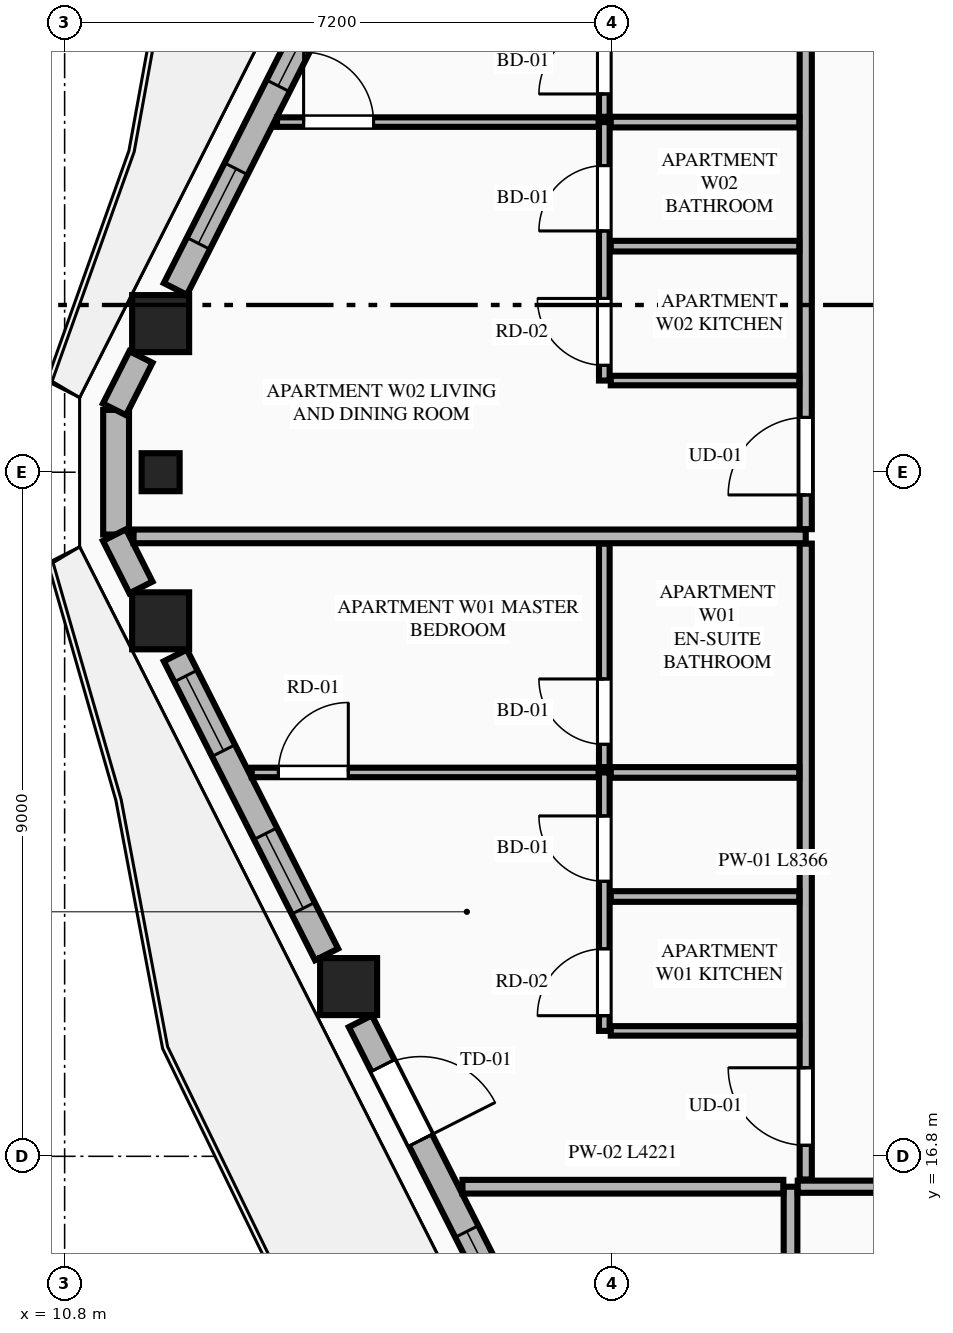
"""IFC4 building model, lengths in metres.
Left out: names, types, materials, properties, quantities, classifications, styles, units other than length and angle.
Written with IfcOpenShell. Run it as: python <this file> out.ifc"""

import sys

from ifc_helpers import new_model, si_unit, direction, frame, frame_2d, origin, origin_2d, place, context, subcontext, project, spatial, rectangle, extrude, element, fill, save


model = new_model("IFC4")
c1 = context("Model", 3, precision=1e-05, world=origin(), true_north=direction((0.0, 1.0)))
c2 = subcontext(c1, "Body", "Model", "MODEL_VIEW")
j1 = project(units=[si_unit("LENGTHUNIT", "METRE"), si_unit("PLANEANGLEUNIT", "RADIAN")], contexts=[c1])
p1 = place(None, origin())
s1 = spatial("IfcSite", under=j1, at=p1, CompositionType="ELEMENT")
p2 = place(p1, origin())
s2 = spatial("IfcBuilding", under=s1, at=p2, CompositionType="ELEMENT")
p3 = place(p2, frame((0.0, 0.0, 256.2)))
s3 = spatial("IfcBuildingStorey", under=s2, at=p3, CompositionType="ELEMENT", Elevation=256.2)
for number, where, z_axis, x_axis in (
    (1, (12.063, 27.755, 0.0), (0.0, 0.0, 1.0), (1.0, 0.0, 0.0)),
    (2, (12.063, 23.845, 0.0), (0.0, 0.0, 1.0), (1.0, 0.0, 0.0)),
    (3, (14.536, 19.033, 0.0), (0.0, 0.0, 1.0), (1.0, 0.0, 0.0)),
):
    element("IfcColumn", number, at=place(p3, frame(where, z_axis=z_axis, x_axis=x_axis)), inside=s3, PredefinedType="COLUMN", context=c2, shape_type="SweptSolid", body=[
        extrude(rectangle(XDim=0.75, YDim=0.75, at=origin_2d()), origin(), (0.0, 0.0, 1.0), 3.65),
    ])
p4 = place(p3, frame((12.063, 25.8, 0.0), z_axis=(0.0, 0.0, 1.0), x_axis=(0.0, -1.0, 0.0)))
e4 = element("IfcColumn", 4, at=p4, inside=s3, PredefinedType="PILASTER", context=c2, shape_type="SweptSolid", body=[
    extrude(rectangle(XDim=0.5, YDim=0.35, at=origin_2d()), origin(), (0.0, 0.0, 1.0), 3.65),
])
p5 = place(p3, frame((11.477, 26.62, 0.0), z_axis=(0.0, 0.0, 1.0), x_axis=(0.0, -1.0, 0.0)))
e5 = element("IfcWall", 5, at=p5, inside=s3, PredefinedType="STANDARD", context=c2, shape_type="SweptSolid", body=[
    extrude(rectangle(XDim=1.64, YDim=0.34, at=frame_2d((0.82, 0.0))), origin(), (0.0, 0.0, 1.0), 3.45),
])
p6 = place(p3, frame((14.246, 32.144, 0.0), z_axis=(0.0, 0.0, 1.0), x_axis=(-0.451285866323, -0.892379441077, 0.0)))
e6 = element("IfcWall", 6, at=p6, inside=s3, PredefinedType="STANDARD", context=c2, shape_type="SweptSolid", body=[
    extrude(rectangle(XDim=4.407, YDim=0.34, at=frame_2d((2.204, 0.0))), origin(), (0.0, 0.0, 1.0), 2.983),
])
p7 = place(p6, frame((0.313, 0.0, 0.75)))
e7 = element("IfcOpeningElement", 7, at=p7, cuts=e6, PredefinedType="OPENING", context=c2, shape_type="SweptSolid", body=[
    extrude(rectangle(XDim=1.1, YDim=2.0, at=frame_2d((0.55, 1.0))), frame((0.0, 0.18, 0.0), z_axis=(0.0, -1.0, 0.0), x_axis=(1.0, 0.0, 0.0)), (0.0, 0.0, 1.0), 0.36),
])
p8 = place(p6, frame((2.636, 0.0, 0.75)))
e8 = element("IfcOpeningElement", 8, at=p8, cuts=e6, PredefinedType="OPENING", context=c2, shape_type="SweptSolid", body=[
    extrude(rectangle(XDim=1.1, YDim=2.0, at=frame_2d((0.55, 1.0))), frame((0.0, 0.18, 0.0), z_axis=(0.0, -1.0, 0.0), x_axis=(1.0, 0.0, 0.0)), (0.0, 0.0, 1.0), 0.36),
])
for number, where, z_axis, x_axis in (
    (9, (11.804, 27.316, 0.0), (0.0, 0.0, 1.0), (-0.451, -0.893, 0.0)),
    (10, (11.456, 24.973, 0.0), (0.0, 0.0, 1.0), (0.451, -0.893, 0.0)),
):
    element("IfcWall", number, at=place(p3, frame(where, z_axis=z_axis, x_axis=x_axis)), inside=s3, PredefinedType="STANDARD", context=c2, shape_type="SweptSolid", body=[
        extrude(rectangle(XDim=0.772, YDim=0.34, at=frame_2d((0.386, 0.0))), origin(), (0.0, 0.0, 1.0), 3.45),
    ])
p9 = place(p3, frame((12.257, 23.389, 0.0), z_axis=(0.0, 0.0, 1.0), x_axis=(0.45130817501, -0.892368158984, 0.0)))
e11 = element("IfcWall", 11, at=p9, inside=s3, PredefinedType="STANDARD", context=c2, shape_type="SweptSolid", body=[
    extrude(rectangle(XDim=4.407, YDim=0.34, at=frame_2d((2.204, 0.0))), origin(), (0.0, 0.0, 1.0), 2.983),
])
p10 = place(p9, frame((0.303, 0.0, 0.75)))
e12 = element("IfcOpeningElement", 12, at=p10, cuts=e11, PredefinedType="OPENING", context=c2, shape_type="SweptSolid", body=[
    extrude(rectangle(XDim=1.1, YDim=2.0, at=frame_2d((0.55, 1.0))), frame((0.0, 0.18, 0.0), z_axis=(0.0, -1.0, 0.0), x_axis=(1.0, 0.0, 0.0)), (0.0, 0.0, 1.0), 0.36),
])
p11 = place(p9, frame((2.627, 0.0, 0.75)))
e13 = element("IfcOpeningElement", 13, at=p11, cuts=e11, PredefinedType="OPENING", context=c2, shape_type="SweptSolid", body=[
    extrude(rectangle(XDim=1.1, YDim=2.0, at=frame_2d((0.55, 1.0))), frame((0.0, 0.18, 0.0), z_axis=(0.0, -1.0, 0.0), x_axis=(1.0, 0.0, 0.0)), (0.0, 0.0, 1.0), 0.36),
])
p12 = place(p3, frame((14.691, 18.577, 0.0), z_axis=(0.0, 0.0, 1.0), x_axis=(0.451581819983, -0.892229712496, 0.0)))
e14 = element("IfcWall", 14, at=p12, inside=s3, PredefinedType="STANDARD", context=c2, shape_type="SweptSolid", body=[
    extrude(rectangle(XDim=4.6, YDim=0.34, at=frame_2d((2.3, 0.0))), origin(), (0.0, 0.0, 1.0), 2.983),
])
p13 = place(p12, frame((0.654, 0.0, 0.0)))
e15 = element("IfcOpeningElement", 15, at=p13, cuts=e14, PredefinedType="OPENING", context=c2, shape_type="SweptSolid", body=[
    extrude(rectangle(XDim=1.1, YDim=2.25, at=frame_2d((0.55, 1.125))), frame((0.0, 0.18, 0.0), z_axis=(0.0, -1.0, 0.0), x_axis=(1.0, 0.0, 0.0)), (0.0, 0.0, 1.0), 0.36),
])
p14 = place(p12, frame((3.1, 0.0, 0.75)))
e16 = element("IfcOpeningElement", 16, at=p14, cuts=e14, PredefinedType="OPENING", context=c2, shape_type="SweptSolid", body=[
    extrude(rectangle(XDim=1.1, YDim=2.0, at=frame_2d((0.55, 1.0))), frame((0.0, 0.18, 0.0), z_axis=(0.0, -1.0, 0.0), x_axis=(1.0, 0.0, 0.0)), (0.0, 0.0, 1.0), 0.36),
])
p15 = place(p3, frame((20.35, 8.119, 0.0), z_axis=(0.0, 0.0, 1.0), x_axis=(0.0, 1.0, 0.0)))
e17 = element("IfcWall", 17, at=p15, inside=s3, PredefinedType="PARTITIONING", context=c2, shape_type="SweptSolid", body=[
    extrude(rectangle(XDim=8.281, YDim=0.18, at=frame_2d((4.141, 0.0))), origin(), (0.0, 0.0, 1.0), 3.45),
])
p16 = place(p3, frame((20.445, 16.4, 0.0), z_axis=(0.0, 0.0, 1.0), x_axis=(1.0, 0.0, 0.0)))
e18 = element("IfcWall", 18, at=p16, inside=s3, PredefinedType="PARTITIONING", context=c2, shape_type="SweptSolid", body=[
    extrude(rectangle(XDim=15.114, YDim=0.16, at=frame_2d((7.557, 0.0))), origin(), (0.0, 0.0, 1.0), 3.45),
])
p17 = place(p16, frame((13.259, 0.0, 0.0)))
e19 = element("IfcOpeningElement", 19, at=p17, cuts=e18, PredefinedType="OPENING", context=c2, shape_type="SweptSolid", body=[
    extrude(rectangle(XDim=1.02, YDim=2.25, at=frame_2d((0.51, 1.125))), frame((0.0, 0.09, 0.0), z_axis=(0.0, -1.0, 0.0), x_axis=(1.0, 0.0, 0.0)), (0.0, 0.0, 1.0), 0.18),
])
p18 = place(p3, frame((16.034, 16.4, 0.0), z_axis=(0.0, 0.0, 1.0), x_axis=(1.0, 0.0, 0.0)))
e20 = element("IfcWall", 20, at=p18, inside=s3, PredefinedType="PARTITIONING", context=c2, shape_type="SweptSolid", body=[
    extrude(rectangle(XDim=4.221, YDim=0.18, at=frame_2d((2.11, 0.0))), origin(), (0.0, 0.0, 1.0), 3.45),
])
p19 = place(p3, frame((20.55, 16.495, 0.0), z_axis=(0.0, 0.0, 1.0), x_axis=(0.0, 1.0, 0.0)))
e21 = element("IfcWall", 21, at=p19, inside=s3, PredefinedType="PARTITIONING", context=c2, shape_type="SweptSolid", body=[
    extrude(rectangle(XDim=8.366, YDim=0.16, at=frame_2d((4.183, 0.0))), origin(), (0.0, 0.0, 1.0), 3.137),
])
p20 = place(p19, frame((0.45, 0.0, 0.0)))
e22 = element("IfcOpeningElement", 22, at=p20, cuts=e21, PredefinedType="OPENING", context=c2, shape_type="SweptSolid", body=[
    extrude(rectangle(XDim=1.02, YDim=2.25, at=frame_2d((0.51, 1.125))), frame((0.0, 0.09, 0.0), z_axis=(0.0, -1.0, 0.0), x_axis=(1.0, 0.0, 0.0)), (0.0, 0.0, 1.0), 0.18),
])
p21 = place(p3, frame((17.985, 18.45, 0.0), z_axis=(0.0, 0.0, 1.0), x_axis=(1.0, 0.0, 0.0)))
e23 = element("IfcWall", 23, at=p21, inside=s3, PredefinedType="PARTITIONING", context=c2, shape_type="SweptSolid", body=[
    extrude(rectangle(XDim=2.48, YDim=0.125, at=frame_2d((1.24, 0.0))), origin(), (0.0, 0.0, 1.0), 3.45),
])
p22 = place(p3, frame((17.9, 18.45, 0.0), z_axis=(0.0, 0.0, 1.0), x_axis=(0.0, 1.0, 0.0)))
e24 = element("IfcWall", 24, at=p22, inside=s3, PredefinedType="PLUMBINGWALL", context=c2, shape_type="SweptSolid", body=[
    extrude(rectangle(XDim=3.4, YDim=0.14, at=frame_2d((1.7, 0.0))), origin(), (0.0, 0.0, 1.0), 3.45),
])
p23 = place(p22, frame((0.2, 0.0, 0.0)))
e25 = element("IfcOpeningElement", 25, at=p23, cuts=e24, PredefinedType="OPENING", context=c2, shape_type="SweptSolid", body=[
    extrude(rectangle(XDim=0.88, YDim=2.15, at=frame_2d((0.44, 1.075))), frame((0.0, 0.08, 0.0), z_axis=(0.0, -1.0, 0.0), x_axis=(1.0, 0.0, 0.0)), (0.0, 0.0, 1.0), 0.16),
])
p24 = place(p22, frame((1.968, 0.0, 0.0)))
e26 = element("IfcOpeningElement", 26, at=p24, cuts=e24, PredefinedType="OPENING", context=c2, shape_type="SweptSolid", body=[
    extrude(rectangle(XDim=0.86, YDim=2.1, at=frame_2d((0.43, 1.05))), frame((0.0, 0.08, 0.0), z_axis=(0.0, -1.0, 0.0), x_axis=(1.0, 0.0, 0.0)), (0.0, 0.0, 1.0), 0.16),
])
p25 = place(p3, frame((17.9, 21.92, 0.0), z_axis=(0.0, 0.0, 1.0), x_axis=(0.0, 1.0, 0.0)))
e27 = element("IfcWall", 27, at=p25, inside=s3, PredefinedType="PLUMBINGWALL", context=c2, shape_type="SweptSolid", body=[
    extrude(rectangle(XDim=2.941, YDim=0.14, at=frame_2d((1.471, 0.0))), origin(), (0.0, 0.0, 1.0), 3.45),
])
p26 = place(p25, frame((0.3, 0.0, 0.0)))
e28 = element("IfcOpeningElement", 28, at=p26, cuts=e27, PredefinedType="OPENING", context=c2, shape_type="SweptSolid", body=[
    extrude(rectangle(XDim=0.86, YDim=2.1, at=frame_2d((0.43, 1.05))), frame((0.0, 0.08, 0.0), z_axis=(0.0, -1.0, 0.0), x_axis=(1.0, 0.0, 0.0)), (0.0, 0.0, 1.0), 0.16),
])
p27 = place(p3, frame((17.985, 21.85, 0.0), z_axis=(0.0, 0.0, 1.0), x_axis=(1.0, 0.0, 0.0)))
e29 = element("IfcWall", 29, at=p27, inside=s3, PredefinedType="PLUMBINGWALL", context=c2, shape_type="SweptSolid", body=[
    extrude(rectangle(XDim=2.48, YDim=0.14, at=frame_2d((1.24, 0.0))), origin(), (0.0, 0.0, 1.0), 3.45),
])
p28 = place(p3, frame((13.262, 21.85, 0.0), z_axis=(0.0, 0.0, 1.0), x_axis=(1.0, 0.0, 0.0)))
e30 = element("IfcWall", 30, at=p28, inside=s3, PredefinedType="PARTITIONING", context=c2, shape_type="SweptSolid", body=[
    extrude(rectangle(XDim=4.563, YDim=0.125, at=frame_2d((2.281, 0.0))), origin(), (0.0, 0.0, 1.0), 3.45),
])
p29 = place(p28, frame((0.35, 0.0, 0.0)))
e31 = element("IfcOpeningElement", 31, at=p29, cuts=e30, PredefinedType="OPENING", context=c2, shape_type="SweptSolid", body=[
    extrude(rectangle(XDim=0.92, YDim=2.15, at=frame_2d((0.46, 1.075))), frame((0.0, 0.073, 0.0), z_axis=(0.0, -1.0, 0.0), x_axis=(1.0, 0.0, 0.0)), (0.0, 0.0, 1.0), 0.145),
])
p30 = place(p3, frame((17.985, 20.218, 0.0), z_axis=(0.0, 0.0, 1.0), x_axis=(1.0, 0.0, 0.0)))
e32 = element("IfcWall", 32, at=p30, inside=s3, PredefinedType="PLUMBINGWALL", context=c2, shape_type="SweptSolid", body=[
    extrude(rectangle(XDim=2.48, YDim=0.14, at=frame_2d((1.24, 0.0))), origin(), (0.0, 0.0, 1.0), 3.45),
])
p31 = place(p3, frame((11.707, 24.956, 0.0), z_axis=(0.0, 0.0, 1.0), x_axis=(1.0, 0.0, 0.0)))
e33 = element("IfcWall", 33, at=p31, inside=s3, PredefinedType="PARTITIONING", context=c2, shape_type="SweptSolid", body=[
    extrude(rectangle(XDim=8.843, YDim=0.18, at=frame_2d((4.421, 0.0))), origin(), (0.0, 0.0, 1.0), 3.45),
])
p32 = place(p3, frame((20.55, 25.051, 0.0), z_axis=(0.0, 0.0, 1.0), x_axis=(0.0, 1.0, 0.0)))
e34 = element("IfcWall", 34, at=p32, inside=s3, PredefinedType="PARTITIONING", context=c2, shape_type="SweptSolid", body=[
    extrude(rectangle(XDim=9.854, YDim=0.16, at=frame_2d((4.927, 0.0))), origin(), (0.0, 0.0, 1.0), 3.137),
])
p33 = place(p32, frame((0.45, 0.0, 0.0)))
e35 = element("IfcOpeningElement", 35, at=p33, cuts=e34, PredefinedType="OPENING", context=c2, shape_type="SweptSolid", body=[
    extrude(rectangle(XDim=1.02, YDim=2.25, at=frame_2d((0.51, 1.125))), frame((0.0, 0.09, 0.0), z_axis=(0.0, -1.0, 0.0), x_axis=(1.0, 0.0, 0.0)), (0.0, 0.0, 1.0), 0.18),
])
p34 = place(p3, frame((17.985, 27.006, 0.0), z_axis=(0.0, 0.0, 1.0), x_axis=(1.0, 0.0, 0.0)))
e36 = element("IfcWall", 36, at=p34, inside=s3, PredefinedType="PARTITIONING", context=c2, shape_type="SweptSolid", body=[
    extrude(rectangle(XDim=2.48, YDim=0.125, at=frame_2d((1.24, 0.0))), origin(), (0.0, 0.0, 1.0), 3.45),
])
p35 = place(p3, frame((17.9, 27.006, 0.0), z_axis=(0.0, 0.0, 1.0), x_axis=(0.0, 1.0, 0.0)))
e37 = element("IfcWall", 37, at=p35, inside=s3, PredefinedType="PLUMBINGWALL", context=c2, shape_type="SweptSolid", body=[
    extrude(rectangle(XDim=3.4, YDim=0.14, at=frame_2d((1.7, 0.0))), origin(), (0.0, 0.0, 1.0), 3.45),
])
p36 = place(p35, frame((0.2, 0.0, 0.0)))
e38 = element("IfcOpeningElement", 38, at=p36, cuts=e37, PredefinedType="OPENING", context=c2, shape_type="SweptSolid", body=[
    extrude(rectangle(XDim=0.88, YDim=2.15, at=frame_2d((0.44, 1.075))), frame((0.0, 0.08, 0.0), z_axis=(0.0, -1.0, 0.0), x_axis=(1.0, 0.0, 0.0)), (0.0, 0.0, 1.0), 0.16),
])
p37 = place(p35, frame((1.968, 0.0, 0.0)))
e39 = element("IfcOpeningElement", 39, at=p37, cuts=e37, PredefinedType="OPENING", context=c2, shape_type="SweptSolid", body=[
    extrude(rectangle(XDim=0.86, YDim=2.1, at=frame_2d((0.43, 1.05))), frame((0.0, 0.08, 0.0), z_axis=(0.0, -1.0, 0.0), x_axis=(1.0, 0.0, 0.0)), (0.0, 0.0, 1.0), 0.16),
])
p38 = place(p3, frame((17.9, 30.476, 0.0), z_axis=(0.0, 0.0, 1.0), x_axis=(0.0, 1.0, 0.0)))
e40 = element("IfcWall", 40, at=p38, inside=s3, PredefinedType="PLUMBINGWALL", context=c2, shape_type="SweptSolid", body=[
    extrude(rectangle(XDim=4.429, YDim=0.14, at=frame_2d((2.214, 0.0))), origin(), (0.0, 0.0, 1.0), 3.45),
])
p39 = place(p38, frame((0.3, 0.0, 0.0)))
e41 = element("IfcOpeningElement", 41, at=p39, cuts=e40, PredefinedType="OPENING", context=c2, shape_type="SweptSolid", body=[
    extrude(rectangle(XDim=0.86, YDim=2.1, at=frame_2d((0.43, 1.05))), frame((0.0, 0.08, 0.0), z_axis=(0.0, -1.0, 0.0), x_axis=(1.0, 0.0, 0.0)), (0.0, 0.0, 1.0), 0.16),
])
p40 = place(p3, frame((17.985, 30.406, 0.0), z_axis=(0.0, 0.0, 1.0), x_axis=(1.0, 0.0, 0.0)))
e42 = element("IfcWall", 42, at=p40, inside=s3, PredefinedType="PLUMBINGWALL", context=c2, shape_type="SweptSolid", body=[
    extrude(rectangle(XDim=2.48, YDim=0.14, at=frame_2d((1.24, 0.0))), origin(), (0.0, 0.0, 1.0), 3.45),
])
p41 = place(p3, frame((13.594, 30.406, 0.0), z_axis=(0.0, 0.0, 1.0), x_axis=(1.0, 0.0, 0.0)))
e43 = element("IfcWall", 43, at=p41, inside=s3, PredefinedType="PARTITIONING", context=c2, shape_type="SweptSolid", body=[
    extrude(rectangle(XDim=4.231, YDim=0.125, at=frame_2d((2.115, 0.0))), origin(), (0.0, 0.0, 1.0), 3.45),
])
p42 = place(p41, frame((0.35, 0.0, 0.0)))
e44 = element("IfcOpeningElement", 44, at=p42, cuts=e43, PredefinedType="OPENING", context=c2, shape_type="SweptSolid", body=[
    extrude(rectangle(XDim=0.92, YDim=2.15, at=frame_2d((0.46, 1.075))), frame((0.0, 0.073, 0.0), z_axis=(0.0, -1.0, 0.0), x_axis=(1.0, 0.0, 0.0)), (0.0, 0.0, 1.0), 0.145),
])
p43 = place(p3, frame((17.985, 28.774, 0.0), z_axis=(0.0, 0.0, 1.0), x_axis=(1.0, 0.0, 0.0)))
e45 = element("IfcWall", 45, at=p43, inside=s3, PredefinedType="PLUMBINGWALL", context=c2, shape_type="SweptSolid", body=[
    extrude(rectangle(XDim=2.48, YDim=0.14, at=frame_2d((1.24, 0.0))), origin(), (0.0, 0.0, 1.0), 3.45),
])
p44 = place(p7, origin())
e46 = element("IfcWindow", 46, at=p44, inside=s3, PartitioningType="SINGLE_PANEL", PredefinedType="WINDOW", context=c2, shape_type="SweptSolid", body=[
    extrude(rectangle(XDim=1.1, YDim=2.0, at=frame_2d((0.55, 1.0))), frame((0.0, 0.03, 0.0), z_axis=(0.0, -1.0, 0.0), x_axis=(1.0, 0.0, 0.0)), (0.0, 0.0, 1.0), 0.06),
])
fill(e7, e46)
p45 = place(p10, origin())
e47 = element("IfcWindow", 47, at=p45, inside=s3, PartitioningType="SINGLE_PANEL", PredefinedType="WINDOW", context=c2, shape_type="SweptSolid", body=[
    extrude(rectangle(XDim=1.1, YDim=2.0, at=frame_2d((0.55, 1.0))), frame((0.0, 0.03, 0.0), z_axis=(0.0, -1.0, 0.0), x_axis=(1.0, 0.0, 0.0)), (0.0, 0.0, 1.0), 0.06),
])
fill(e12, e47)
p46 = place(p13, origin())
e48 = element("IfcDoor", 48, at=p46, inside=s3, OperationType="SINGLE_SWING_RIGHT", PredefinedType="DOOR", context=c2, shape_type="SweptSolid", body=[
    extrude(rectangle(XDim=1.1, YDim=2.25, at=frame_2d((0.55, 1.125))), frame((0.0, 0.025, 0.0), z_axis=(0.0, -1.0, 0.0), x_axis=(1.0, 0.0, 0.0)), (0.0, 0.0, 1.0), 0.05),
])
fill(e15, e48)
p47 = place(p23, origin())
e49 = element("IfcDoor", 49, at=p47, inside=s3, OperationType="SINGLE_SWING_LEFT", PredefinedType="DOOR", context=c2, shape_type="SweptSolid", body=[
    extrude(rectangle(XDim=0.88, YDim=2.15, at=frame_2d((0.44, 1.075))), frame((0.0, 0.025, 0.0), z_axis=(0.0, -1.0, 0.0), x_axis=(1.0, 0.0, 0.0)), (0.0, 0.0, 1.0), 0.05),
])
fill(e25, e49)
p48 = place(p24, origin())
e50 = element("IfcDoor", 50, at=p48, inside=s3, OperationType="SINGLE_SWING_RIGHT", PredefinedType="DOOR", context=c2, shape_type="SweptSolid", body=[
    extrude(rectangle(XDim=0.86, YDim=2.1, at=frame_2d((0.43, 1.05))), frame((0.0, 0.025, 0.0), z_axis=(0.0, -1.0, 0.0), x_axis=(1.0, 0.0, 0.0)), (0.0, 0.0, 1.0), 0.05),
])
fill(e26, e50)
p49 = place(p26, origin())
e51 = element("IfcDoor", 51, at=p49, inside=s3, OperationType="SINGLE_SWING_RIGHT", PredefinedType="DOOR", context=c2, shape_type="SweptSolid", body=[
    extrude(rectangle(XDim=0.86, YDim=2.1, at=frame_2d((0.43, 1.05))), frame((0.0, 0.025, 0.0), z_axis=(0.0, -1.0, 0.0), x_axis=(1.0, 0.0, 0.0)), (0.0, 0.0, 1.0), 0.05),
])
fill(e28, e51)
p50 = place(p20, origin())
e52 = element("IfcDoor", 52, at=p50, inside=s3, OperationType="SINGLE_SWING_RIGHT", PredefinedType="DOOR", context=c2, shape_type="SweptSolid", body=[
    extrude(rectangle(XDim=1.02, YDim=2.25, at=frame_2d((0.51, 1.125))), frame((0.0, 0.025, 0.0), z_axis=(0.0, -1.0, 0.0), x_axis=(1.0, 0.0, 0.0)), (0.0, 0.0, 1.0), 0.05),
])
fill(e22, e52)
p51 = place(p29, origin())
e53 = element("IfcDoor", 53, at=p51, inside=s3, OperationType="SINGLE_SWING_RIGHT", PredefinedType="DOOR", context=c2, shape_type="SweptSolid", body=[
    extrude(rectangle(XDim=0.92, YDim=2.15, at=frame_2d((0.46, 1.075))), frame((0.0, 0.025, 0.0), z_axis=(0.0, -1.0, 0.0), x_axis=(1.0, 0.0, 0.0)), (0.0, 0.0, 1.0), 0.05),
])
fill(e31, e53)
p52 = place(p36, origin())
e54 = element("IfcDoor", 54, at=p52, inside=s3, OperationType="SINGLE_SWING_RIGHT", PredefinedType="DOOR", context=c2, shape_type="SweptSolid", body=[
    extrude(rectangle(XDim=0.88, YDim=2.15, at=frame_2d((0.44, 1.075))), frame((0.0, 0.025, 0.0), z_axis=(0.0, -1.0, 0.0), x_axis=(1.0, 0.0, 0.0)), (0.0, 0.0, 1.0), 0.05),
])
fill(e38, e54)
p53 = place(p37, origin())
e55 = element("IfcDoor", 55, at=p53, inside=s3, OperationType="SINGLE_SWING_LEFT", PredefinedType="DOOR", context=c2, shape_type="SweptSolid", body=[
    extrude(rectangle(XDim=0.86, YDim=2.1, at=frame_2d((0.43, 1.05))), frame((0.0, 0.025, 0.0), z_axis=(0.0, -1.0, 0.0), x_axis=(1.0, 0.0, 0.0)), (0.0, 0.0, 1.0), 0.05),
])
fill(e39, e55)
p54 = place(p39, origin())
e56 = element("IfcDoor", 56, at=p54, inside=s3, OperationType="SINGLE_SWING_LEFT", PredefinedType="DOOR", context=c2, shape_type="SweptSolid", body=[
    extrude(rectangle(XDim=0.86, YDim=2.1, at=frame_2d((0.43, 1.05))), frame((0.0, 0.025, 0.0), z_axis=(0.0, -1.0, 0.0), x_axis=(1.0, 0.0, 0.0)), (0.0, 0.0, 1.0), 0.05),
])
fill(e41, e56)
p55 = place(p33, origin())
e57 = element("IfcDoor", 57, at=p55, inside=s3, OperationType="SINGLE_SWING_LEFT", PredefinedType="DOOR", context=c2, shape_type="SweptSolid", body=[
    extrude(rectangle(XDim=1.02, YDim=2.25, at=frame_2d((0.51, 1.125))), frame((0.0, 0.025, 0.0), z_axis=(0.0, -1.0, 0.0), x_axis=(1.0, 0.0, 0.0)), (0.0, 0.0, 1.0), 0.05),
])
fill(e35, e57)
p56 = place(p42, origin())
e58 = element("IfcDoor", 58, at=p56, inside=s3, OperationType="SINGLE_SWING_LEFT", PredefinedType="DOOR", context=c2, shape_type="SweptSolid", body=[
    extrude(rectangle(XDim=0.92, YDim=2.15, at=frame_2d((0.46, 1.075))), frame((0.0, 0.025, 0.0), z_axis=(0.0, -1.0, 0.0), x_axis=(1.0, 0.0, 0.0)), (0.0, 0.0, 1.0), 0.05),
])
fill(e44, e58)
p57 = place(p8, origin())
e59 = element("IfcWindow", 59, at=p57, inside=s3, PartitioningType="SINGLE_PANEL", PredefinedType="WINDOW", context=c2, shape_type="SweptSolid", body=[
    extrude(rectangle(XDim=1.1, YDim=2.0, at=frame_2d((0.55, 1.0))), frame((0.0, 0.03, 0.0), z_axis=(0.0, -1.0, 0.0), x_axis=(1.0, 0.0, 0.0)), (0.0, 0.0, 1.0), 0.06),
])
fill(e8, e59)
p58 = place(p11, origin())
e60 = element("IfcWindow", 60, at=p58, inside=s3, PartitioningType="SINGLE_PANEL", PredefinedType="WINDOW", context=c2, shape_type="SweptSolid", body=[
    extrude(rectangle(XDim=1.1, YDim=2.0, at=frame_2d((0.55, 1.0))), frame((0.0, 0.03, 0.0), z_axis=(0.0, -1.0, 0.0), x_axis=(1.0, 0.0, 0.0)), (0.0, 0.0, 1.0), 0.06),
])
fill(e13, e60)
p59 = place(p14, origin())
e61 = element("IfcWindow", 61, at=p59, inside=s3, PartitioningType="SINGLE_PANEL", PredefinedType="WINDOW", context=c2, shape_type="SweptSolid", body=[
    extrude(rectangle(XDim=1.1, YDim=2.0, at=frame_2d((0.55, 1.0))), frame((0.0, 0.03, 0.0), z_axis=(0.0, -1.0, 0.0), x_axis=(1.0, 0.0, 0.0)), (0.0, 0.0, 1.0), 0.06),
])
fill(e16, e61)
save(model, sys.argv[1])
